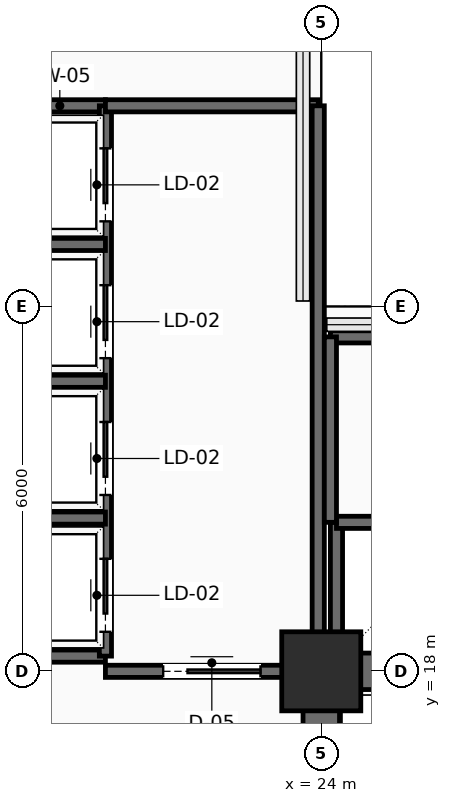
"""IFC4 building model, lengths in metres.
Left out: names, types, materials, properties, quantities, classifications, styles, units other than length and angle.
Written with IfcOpenShell. Run it as: python <this file> out.ifc"""

import sys

from ifc_helpers import new_model, si_unit, direction, frame, frame_2d, origin, origin_2d, place, context, subcontext, project, spatial, rectangle, extrude, element, fill, save


model = new_model("IFC4")
c1 = context("Model", 3, precision=1e-05, world=origin(), true_north=direction((0.0, 1.0)))
c2 = subcontext(c1, "Body", "Model", "MODEL_VIEW")
j1 = project(units=[si_unit("LENGTHUNIT", "METRE"), si_unit("PLANEANGLEUNIT", "RADIAN")], contexts=[c1])
p1 = place(None, origin())
s1 = spatial("IfcSite", under=j1, at=p1, CompositionType="ELEMENT")
p2 = place(p1, origin())
s2 = spatial("IfcBuilding", under=s1, at=p2, CompositionType="ELEMENT")
p3 = place(p2, frame((0.0, 0.0, 79.2)))
s3 = spatial("IfcBuildingStorey", under=s2, at=p3, CompositionType="ELEMENT", Elevation=79.2)
p4 = place(p3, frame((24.0, 18.0, 0.0), z_axis=(0.0, 0.0, 1.0), x_axis=(1.0, 0.0, 0.0)))
e1 = element("IfcColumn", 1, at=p4, inside=s3, PredefinedType="COLUMN", context=c2, shape_type="SweptSolid", body=[
    extrude(rectangle(XDim=1.3, YDim=1.3, at=origin_2d()), origin(), (0.0, 0.0, 1.0), 3.9),
])
p5 = place(p3, frame((24.0, 18.0, 0.0), z_axis=(0.0, 0.0, 1.0), x_axis=(1.0, 0.0, 0.0)))
e2 = element("IfcWall", 2, at=p5, inside=s3, PredefinedType="SHEAR", context=c2, shape_type="SweptSolid", body=[
    extrude(rectangle(XDim=9.6, YDim=0.6, at=frame_2d((4.8, 0.0))), origin(), (0.0, 0.0, 1.0), 3.65),
])
p6 = place(p3, frame((24.0, 6.0, 0.0), z_axis=(0.0, 0.0, 1.0), x_axis=(0.0, 1.0, 0.0)))
e3 = element("IfcWall", 3, at=p6, inside=s3, PredefinedType="SHEAR", context=c2, shape_type="SweptSolid", body=[
    extrude(rectangle(XDim=12.0, YDim=0.6, at=frame_2d((6.0, 0.0))), origin(), (0.0, 0.0, 1.0), 3.65),
])
p7 = place(p6, frame((7.15, 0.0, 0.0)))
e4 = element("IfcOpeningElement", 4, at=p7, cuts=e3, PredefinedType="OPENING", context=c2, shape_type="SweptSolid", body=[
    extrude(rectangle(XDim=1.6, YDim=2.3, at=frame_2d((0.8, 1.15))), frame((0.0, 0.31, 0.0), z_axis=(0.0, -1.0, 0.0), x_axis=(1.0, 0.0, 0.0)), (0.0, 0.0, 1.0), 0.62),
])
for number, where, z_axis, x_axis in (
    (5, (18.1, 27.3, 0.0), (0.0, 0.0, 1.0), (1.0, 0.0, 0.0)),
    (6, (18.1, 18.25, 0.0), (0.0, 0.0, 1.0), (1.0, 0.0, 0.0)),
):
    element("IfcWall", number, at=place(p3, frame(where, z_axis=z_axis, x_axis=x_axis)), inside=s3, PredefinedType="SHEAR", context=c2, shape_type="SweptSolid", body=[
        extrude(rectangle(XDim=2.35, YDim=0.2, at=frame_2d((1.175, 0.0))), origin(), (0.0, 0.0, 1.0), 3.65),
    ])
p8 = place(p3, frame((20.45, 18.25, 0.0), z_axis=(0.0, 0.0, 1.0), x_axis=(0.0, 1.0, 0.0)))
e7 = element("IfcWall", 7, at=p8, inside=s3, PredefinedType="SHEAR", context=c2, shape_type="SweptSolid", body=[
    extrude(rectangle(XDim=9.05, YDim=0.2, at=frame_2d((4.525, 0.0))), origin(), (0.0, 0.0, 1.0), 3.65),
])
p9 = place(p8, frame((0.4, 0.0, 0.0)))
e8 = element("IfcOpeningElement", 8, at=p9, cuts=e7, PredefinedType="OPENING", context=c2, shape_type="SweptSolid", body=[
    extrude(rectangle(XDim=1.2, YDim=2.2, at=frame_2d((0.6, 1.1))), frame((0.0, 0.11, 0.0), z_axis=(0.0, -1.0, 0.0), x_axis=(1.0, 0.0, 0.0)), (0.0, 0.0, 1.0), 0.22),
])
p10 = place(p8, frame((2.65, 0.0, 0.0)))
e9 = element("IfcOpeningElement", 9, at=p10, cuts=e7, PredefinedType="OPENING", context=c2, shape_type="SweptSolid", body=[
    extrude(rectangle(XDim=1.2, YDim=2.2, at=frame_2d((0.6, 1.1))), frame((0.0, 0.11, 0.0), z_axis=(0.0, -1.0, 0.0), x_axis=(1.0, 0.0, 0.0)), (0.0, 0.0, 1.0), 0.22),
])
p11 = place(p8, frame((4.9, 0.0, 0.0)))
e10 = element("IfcOpeningElement", 10, at=p11, cuts=e7, PredefinedType="OPENING", context=c2, shape_type="SweptSolid", body=[
    extrude(rectangle(XDim=1.2, YDim=2.2, at=frame_2d((0.6, 1.1))), frame((0.0, 0.11, 0.0), z_axis=(0.0, -1.0, 0.0), x_axis=(1.0, 0.0, 0.0)), (0.0, 0.0, 1.0), 0.22),
])
p12 = place(p8, frame((7.15, 0.0, 0.0)))
e11 = element("IfcOpeningElement", 11, at=p12, cuts=e7, PredefinedType="OPENING", context=c2, shape_type="SweptSolid", body=[
    extrude(rectangle(XDim=1.2, YDim=2.2, at=frame_2d((0.6, 1.1))), frame((0.0, 0.11, 0.0), z_axis=(0.0, -1.0, 0.0), x_axis=(1.0, 0.0, 0.0)), (0.0, 0.0, 1.0), 0.22),
])
for number, where, z_axis, x_axis in (
    (12, (18.15, 20.52, 0.0), (0.0, 0.0, 1.0), (1.0, 0.0, 0.0)),
    (13, (18.15, 22.77, 0.0), (0.0, 0.0, 1.0), (1.0, 0.0, 0.0)),
    (14, (18.15, 25.02, 0.0), (0.0, 0.0, 1.0), (1.0, 0.0, 0.0)),
):
    element("IfcWall", number, at=place(p3, frame(where, z_axis=z_axis, x_axis=x_axis)), inside=s3, PredefinedType="SHEAR", context=c2, shape_type="SweptSolid", body=[
        extrude(rectangle(XDim=2.3, YDim=0.2, at=frame_2d((1.15, 0.0))), origin(), (0.0, 0.0, 1.0), 3.65),
    ])
p13 = place(p3, frame((20.45, 18.0, 0.0), z_axis=(0.0, 0.0, 1.0), x_axis=(1.0, 0.0, 0.0)))
e15 = element("IfcWall", 15, at=p13, inside=s3, PredefinedType="SHEAR", context=c2, shape_type="SweptSolid", body=[
    extrude(rectangle(XDim=3.5, YDim=0.2, at=frame_2d((1.75, 0.0))), origin(), (0.0, 0.0, 1.0), 3.65),
])
p14 = place(p13, frame((0.95, 0.0, 0.0)))
e16 = element("IfcOpeningElement", 16, at=p14, cuts=e15, PredefinedType="OPENING", context=c2, shape_type="SweptSolid", body=[
    extrude(rectangle(XDim=1.6, YDim=2.3, at=frame_2d((0.8, 1.15))), frame((0.0, 0.11, 0.0), z_axis=(0.0, -1.0, 0.0), x_axis=(1.0, 0.0, 0.0)), (0.0, 0.0, 1.0), 0.22),
])
p15 = place(p3, frame((20.45, 27.3, 0.0), z_axis=(0.0, 0.0, 1.0), x_axis=(1.0, 0.0, 0.0)))
e17 = element("IfcWall", 17, at=p15, inside=s3, PredefinedType="SHEAR", context=c2, shape_type="SweptSolid", body=[
    extrude(rectangle(XDim=3.5, YDim=0.2, at=frame_2d((1.75, 0.0))), origin(), (0.0, 0.0, 1.0), 3.65),
])
p16 = place(p3, frame((23.95, 18.0, 0.0), z_axis=(0.0, 0.0, 1.0), x_axis=(0.0, 1.0, 0.0)))
e18 = element("IfcWall", 18, at=p16, inside=s3, PredefinedType="SHEAR", context=c2, shape_type="SweptSolid", body=[
    extrude(rectangle(XDim=9.3, YDim=0.2, at=frame_2d((4.65, 0.0))), origin(), (0.0, 0.0, 1.0), 3.65),
])
p17 = place(p3, frame((24.25, 18.1, 0.0), z_axis=(0.0, 0.0, 1.0), x_axis=(0.0, 1.0, 0.0)))
e19 = element("IfcWall", 19, at=p17, inside=s3, PredefinedType="SHEAR", context=c2, shape_type="SweptSolid", body=[
    extrude(rectangle(XDim=2.35, YDim=0.2, at=frame_2d((1.175, 0.0))), origin(), (0.0, 0.0, 1.0), 3.65),
])
p18 = place(p3, frame((24.25, 20.45, 0.0), z_axis=(0.0, 0.0, 1.0), x_axis=(1.0, 0.0, 0.0)))
e20 = element("IfcWall", 20, at=p18, inside=s3, PredefinedType="SHEAR", context=c2, shape_type="SweptSolid", body=[
    extrude(rectangle(XDim=9.05, YDim=0.2, at=frame_2d((4.525, 0.0))), origin(), (0.0, 0.0, 1.0), 3.65),
])
p19 = place(p3, frame((24.15, 23.5, 0.0), z_axis=(0.0, 0.0, 1.0), x_axis=(1.0, 0.0, 0.0)))
e21 = element("IfcWall", 21, at=p19, inside=s3, PredefinedType="SHEAR", context=c2, shape_type="SweptSolid", body=[
    extrude(rectangle(XDim=9.15, YDim=0.2, at=frame_2d((4.575, 0.0))), origin(), (0.0, 0.0, 1.0), 3.65),
])
p20 = place(p3, frame((24.15, 20.45, 0.0), z_axis=(0.0, 0.0, 1.0), x_axis=(0.0, 1.0, 0.0)))
e22 = element("IfcWall", 22, at=p20, inside=s3, PredefinedType="SHEAR", context=c2, shape_type="SweptSolid", body=[
    extrude(rectangle(XDim=3.05, YDim=0.2, at=frame_2d((1.525, 0.0))), origin(), (0.0, 0.0, 1.0), 3.65),
])
p21 = place(p9, origin())
e23 = element("IfcDoor", 23, at=p21, inside=s3, OperationType="SLIDING_TO_RIGHT", PredefinedType="DOOR", context=c2, shape_type="SweptSolid", body=[
    extrude(rectangle(XDim=1.2, YDim=2.2, at=frame_2d((0.6, 1.1))), frame((0.0, 0.025, 0.0), z_axis=(0.0, -1.0, 0.0), x_axis=(1.0, 0.0, 0.0)), (0.0, 0.0, 1.0), 0.05),
])
fill(e8, e23)
p22 = place(p10, origin())
e24 = element("IfcDoor", 24, at=p22, inside=s3, OperationType="SLIDING_TO_RIGHT", PredefinedType="DOOR", context=c2, shape_type="SweptSolid", body=[
    extrude(rectangle(XDim=1.2, YDim=2.2, at=frame_2d((0.6, 1.1))), frame((0.0, 0.025, 0.0), z_axis=(0.0, -1.0, 0.0), x_axis=(1.0, 0.0, 0.0)), (0.0, 0.0, 1.0), 0.05),
])
fill(e9, e24)
p23 = place(p11, origin())
e25 = element("IfcDoor", 25, at=p23, inside=s3, OperationType="SLIDING_TO_RIGHT", PredefinedType="DOOR", context=c2, shape_type="SweptSolid", body=[
    extrude(rectangle(XDim=1.2, YDim=2.2, at=frame_2d((0.6, 1.1))), frame((0.0, 0.025, 0.0), z_axis=(0.0, -1.0, 0.0), x_axis=(1.0, 0.0, 0.0)), (0.0, 0.0, 1.0), 0.05),
])
fill(e10, e25)
p24 = place(p12, origin())
e26 = element("IfcDoor", 26, at=p24, inside=s3, OperationType="SLIDING_TO_RIGHT", PredefinedType="DOOR", context=c2, shape_type="SweptSolid", body=[
    extrude(rectangle(XDim=1.2, YDim=2.2, at=frame_2d((0.6, 1.1))), frame((0.0, 0.025, 0.0), z_axis=(0.0, -1.0, 0.0), x_axis=(1.0, 0.0, 0.0)), (0.0, 0.0, 1.0), 0.05),
])
fill(e11, e26)
p25 = place(p14, origin())
e27 = element("IfcDoor", 27, at=p25, inside=s3, OperationType="DOUBLE_DOOR_SLIDING", PredefinedType="DOOR", context=c2, shape_type="SweptSolid", body=[
    extrude(rectangle(XDim=1.6, YDim=2.3, at=frame_2d((0.8, 1.15))), frame((0.0, 0.025, 0.0), z_axis=(0.0, -1.0, 0.0), x_axis=(1.0, 0.0, 0.0)), (0.0, 0.0, 1.0), 0.05),
])
fill(e16, e27)
save(model, sys.argv[1])
